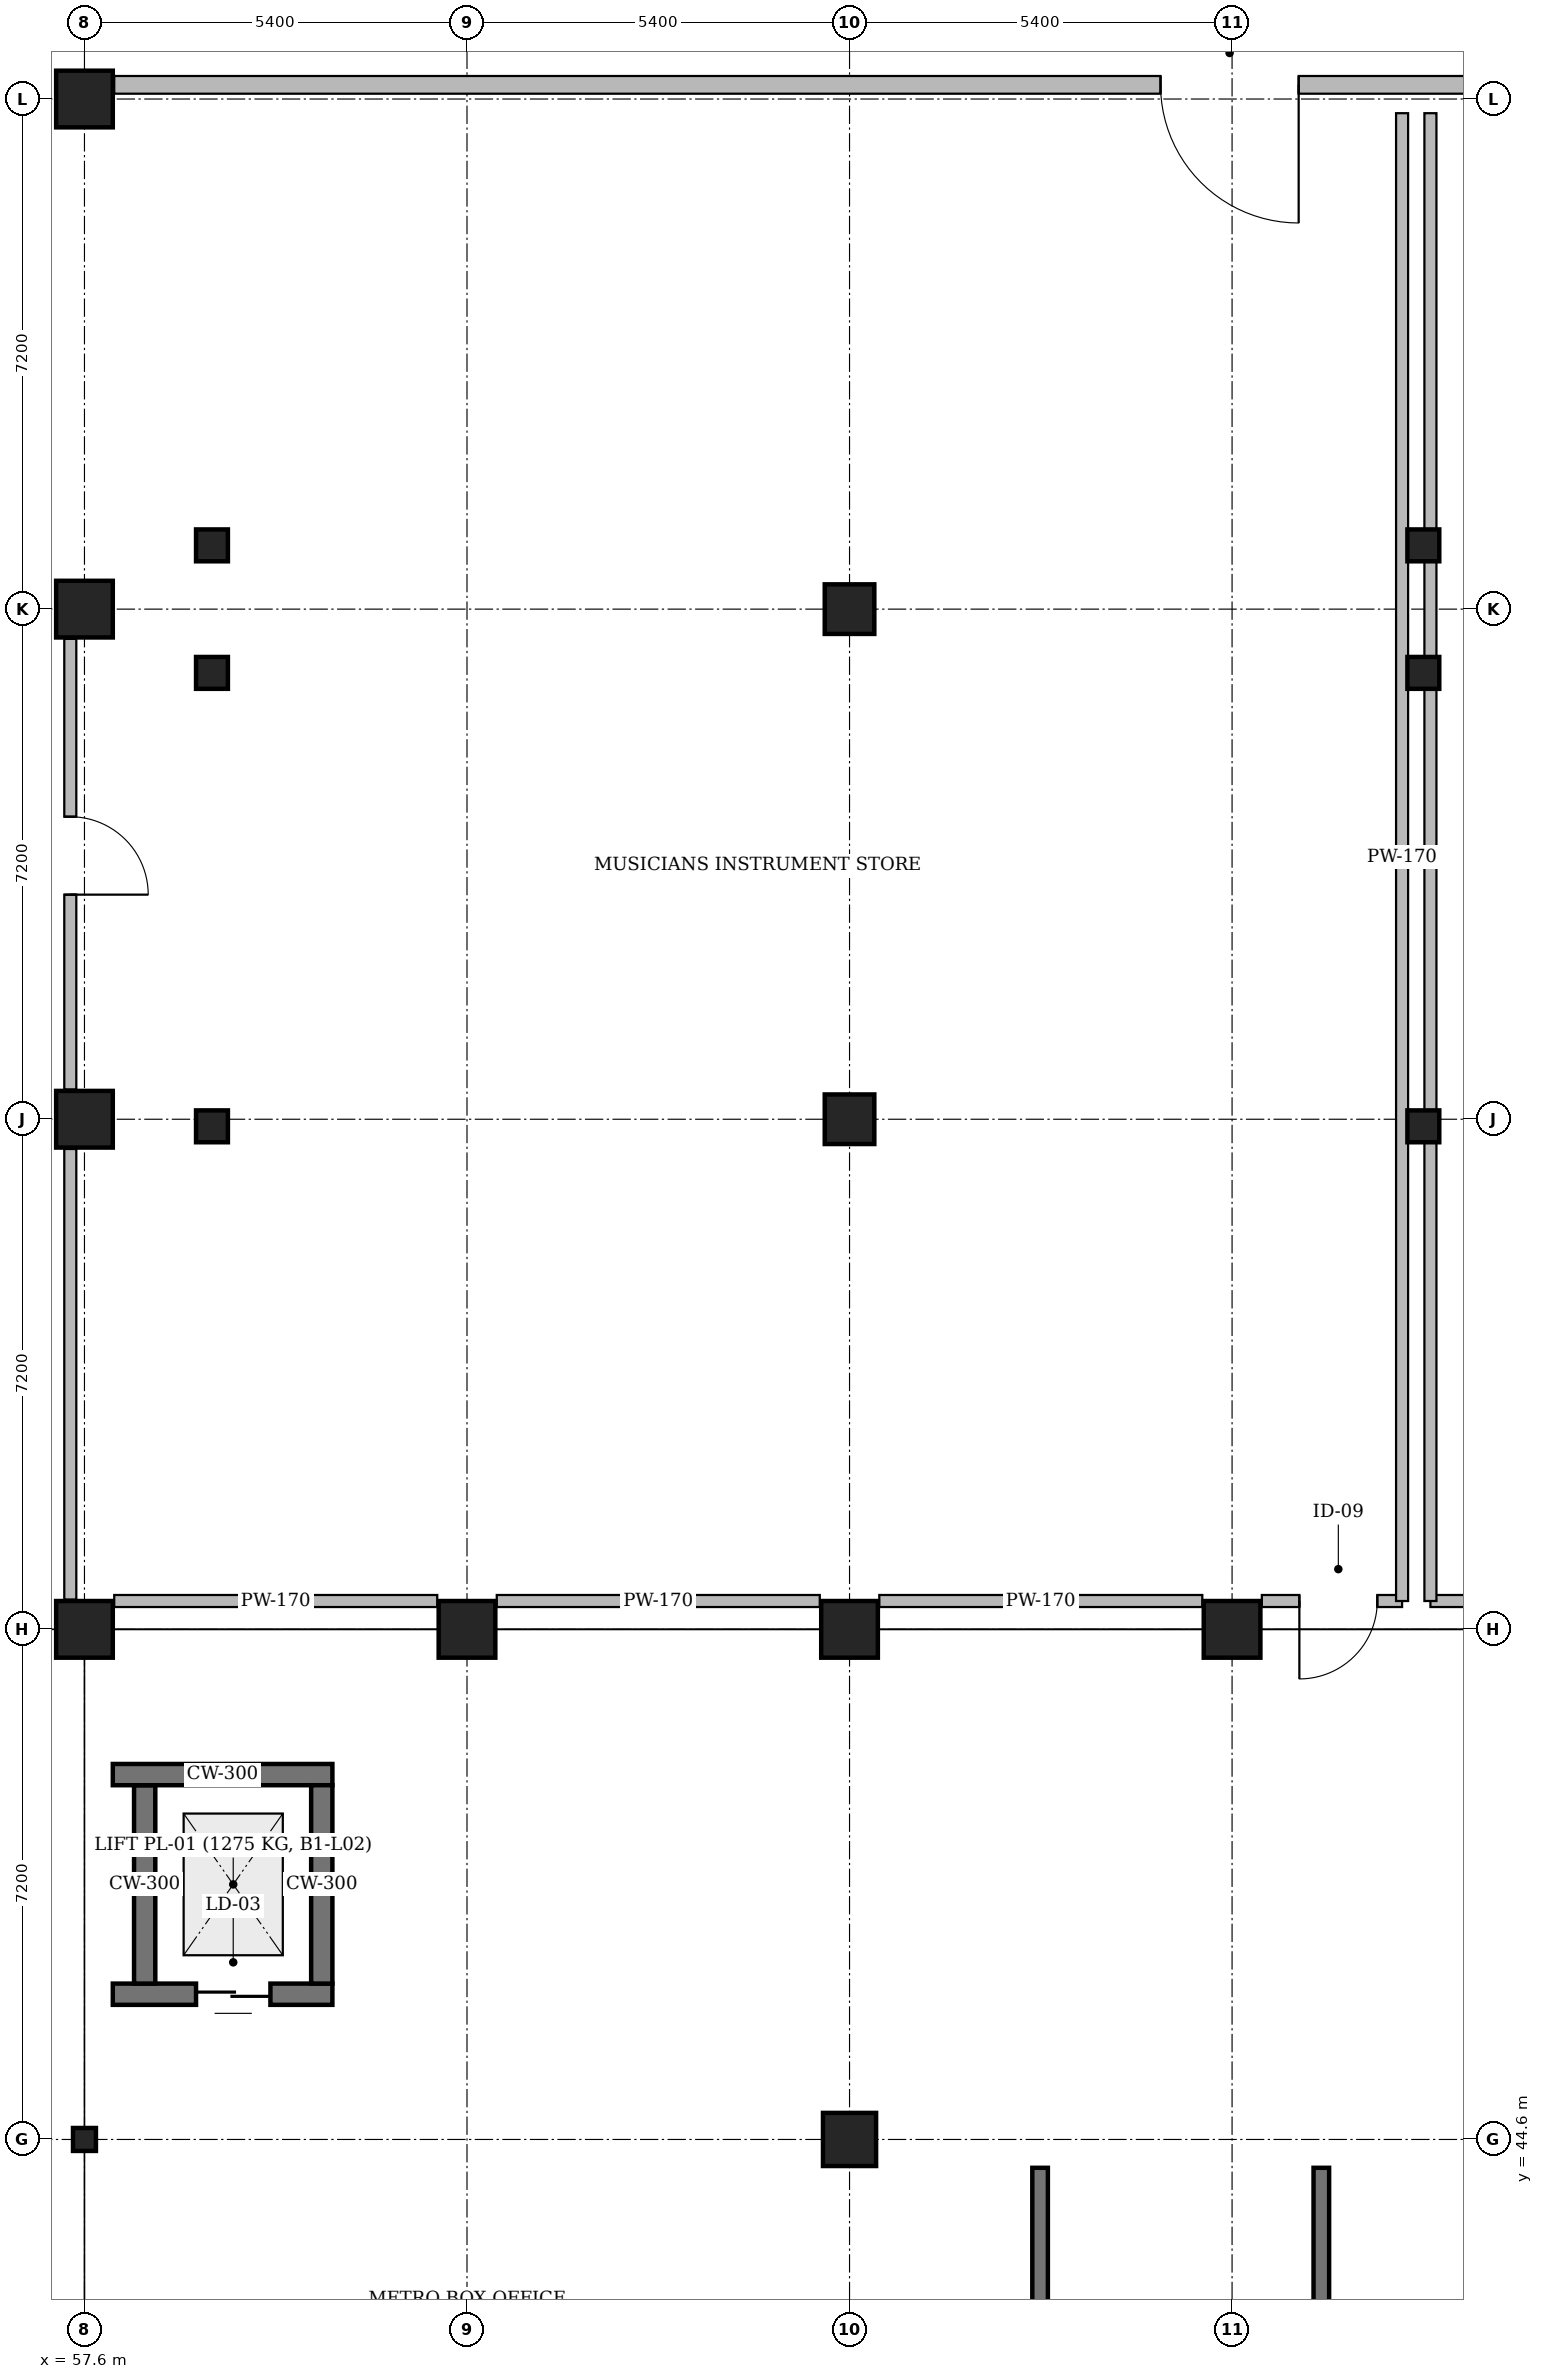
"""IFC4 building model, lengths in metres.
Left out: names, types, materials, properties, quantities, classifications, styles, units other than length and angle.
Written with IfcOpenShell. Run it as: python <this file> out.ifc"""

import sys

from ifc_helpers import new_model, si_unit, direction, frame, frame_2d, origin, origin_2d, place, context, subcontext, project, spatial, rectangle, circle, hollow_circle, extrude, element, fill, save


model = new_model("IFC4")
c1 = context("Model", 3, precision=1e-05, world=origin(), true_north=direction((0.0, 1.0)))
c2 = subcontext(c1, "Body", "Model", "MODEL_VIEW")
j1 = project(units=[si_unit("LENGTHUNIT", "METRE"), si_unit("PLANEANGLEUNIT", "RADIAN")], contexts=[c1])
p1 = place(None, origin())
s1 = spatial("IfcSite", under=j1, at=p1, CompositionType="ELEMENT")
p2 = place(p1, origin())
s2 = spatial("IfcBuilding", under=s1, at=p2, CompositionType="ELEMENT")
p3 = place(p2, frame((0.0, 0.0, -4.8)))
s3 = spatial("IfcBuildingStorey", under=s2, at=p3, CompositionType="ELEMENT", Elevation=-4.8)
p4 = place(p3, frame((68.4, 44.6, 0.0), z_axis=(0.0, 0.0, 1.0), x_axis=(1.0, 0.0, 0.0)))
e1 = element("IfcColumn", 1, at=p4, inside=s3, PredefinedType="COLUMN", context=c2, shape_type="SweptSolid", body=[
    extrude(circle(Radius=0.375, at=origin_2d()), origin(), (0.0, 0.0, 1.0), 4.8),
])
p5 = place(p3, frame((68.4, 51.8, 0.0), z_axis=(0.0, 0.0, 1.0), x_axis=(1.0, 0.0, 0.0)))
e2 = element("IfcColumn", 2, at=p5, inside=s3, PredefinedType="COLUMN", context=c2, shape_type="SweptSolid", body=[
    extrude(rectangle(XDim=0.8, YDim=0.8, at=origin_2d()), origin(), (0.0, 0.0, 1.0), 4.8),
])
for number, where, z_axis, x_axis in (
    (3, (68.4, 59.0, 0.0), (0.0, 0.0, 1.0), (1.0, 0.0, 0.0)),
    (4, (68.4, 66.2, 0.0), (0.0, 0.0, 1.0), (1.0, 0.0, 0.0)),
):
    element("IfcColumn", number, at=place(p3, frame(where, z_axis=z_axis, x_axis=x_axis)), inside=s3, PredefinedType="COLUMN", context=c2, shape_type="SweptSolid", body=[
        extrude(rectangle(XDim=0.7, YDim=0.7, at=origin_2d()), origin(), (0.0, 0.0, 1.0), 4.8),
    ])
p6 = place(p3, frame((73.8, 51.8, 0.0), z_axis=(0.0, 0.0, 1.0), x_axis=(1.0, 0.0, 0.0)))
e5 = element("IfcColumn", 5, at=p6, inside=s3, PredefinedType="COLUMN", context=c2, shape_type="SweptSolid", body=[
    extrude(rectangle(XDim=0.8, YDim=0.8, at=origin_2d()), origin(), (0.0, 0.0, 1.0), 4.8),
])
p7 = place(p3, frame((57.6, 44.6, 0.0), z_axis=(0.0, 0.0, 1.0), x_axis=(1.0, 0.0, 0.0)))
e6 = element("IfcColumn", 6, at=p7, inside=s3, PredefinedType="COLUMN", context=c2, shape_type="SweptSolid", body=[
    extrude(hollow_circle(Radius=0.162, WallThickness=0.012, at=origin_2d()), origin(), (0.0, 0.0, 1.0), 4.8),
])
for number, where, z_axis, x_axis in (
    (7, (57.6, 51.8, 0.0), (0.0, 0.0, 1.0), (1.0, 0.0, 0.0)),
    (8, (57.6, 59.0, 0.0), (0.0, 0.0, 1.0), (1.0, 0.0, 0.0)),
    (9, (57.6, 66.2, 0.0), (0.0, 0.0, 1.0), (1.0, 0.0, 0.0)),
    (10, (57.6, 73.4, 0.0), (0.0, 0.0, 1.0), (1.0, 0.0, 0.0)),
    (11, (63.0, 51.8, 0.0), (0.0, 0.0, 1.0), (1.0, 0.0, 0.0)),
):
    element("IfcColumn", number, at=place(p3, frame(where, z_axis=z_axis, x_axis=x_axis)), inside=s3, PredefinedType="COLUMN", context=c2, shape_type="SweptSolid", body=[
        extrude(rectangle(XDim=0.8, YDim=0.8, at=origin_2d()), origin(), (0.0, 0.0, 1.0), 4.8),
    ])
for number, where, z_axis, x_axis in (
    (12, (59.4, 67.1, 0.0), (0.0, 0.0, 1.0), (1.0, 0.0, 0.0)),
    (13, (76.5, 67.1, 0.0), (0.0, 0.0, 1.0), (1.0, 0.0, 0.0)),
    (14, (59.4, 65.3, 0.0), (0.0, 0.0, 1.0), (1.0, 0.0, 0.0)),
    (15, (76.5, 65.3, 0.0), (0.0, 0.0, 1.0), (1.0, 0.0, 0.0)),
    (16, (59.4, 58.9, 0.0), (0.0, 0.0, 1.0), (1.0, 0.0, 0.0)),
    (17, (76.5, 58.9, 0.0), (0.0, 0.0, 1.0), (1.0, 0.0, 0.0)),
):
    element("IfcColumn", number, at=place(p3, frame(where, z_axis=z_axis, x_axis=x_axis)), inside=s3, PredefinedType="COLUMN", context=c2, shape_type="SweptSolid", body=[
        extrude(rectangle(XDim=0.45, YDim=0.45, at=origin_2d()), origin(), (0.0, 0.0, 1.0), 4.8),
    ])
p8 = place(p3, frame((61.1, 46.65, 0.0), z_axis=(0.0, 0.0, 1.0), x_axis=(-1.0, 0.0, 0.0)))
e18 = element("IfcWall", 18, at=p8, inside=s3, PredefinedType="SOLIDWALL", context=c2, shape_type="SweptSolid", body=[
    extrude(rectangle(XDim=3.1, YDim=0.3, at=frame_2d((1.55, 0.0))), origin(), (0.0, 0.0, 1.0), 4.8),
])
p9 = place(p8, frame((0.875, 0.0, 0.0)))
e19 = element("IfcOpeningElement", 19, at=p9, cuts=e18, PredefinedType="OPENING", context=c2, shape_type="SweptSolid", body=[
    extrude(rectangle(XDim=1.05, YDim=2.1, at=frame_2d((0.525, 1.05))), frame((0.0, 0.17, 0.0), z_axis=(0.0, -1.0, 0.0), x_axis=(1.0, 0.0, 0.0)), (0.0, 0.0, 1.0), 0.34),
])
p10 = place(p3, frame((58.45, 46.8, 0.0), z_axis=(0.0, 0.0, 1.0), x_axis=(0.0, 1.0, 0.0)))
e20 = element("IfcWall", 20, at=p10, inside=s3, PredefinedType="SOLIDWALL", context=c2, shape_type="SweptSolid", body=[
    extrude(rectangle(XDim=2.8, YDim=0.3, at=frame_2d((1.4, 0.0))), origin(), (0.0, 0.0, 1.0), 4.8),
])
p11 = place(p3, frame((58.0, 49.75, 0.0), z_axis=(0.0, 0.0, 1.0), x_axis=(1.0, 0.0, 0.0)))
e21 = element("IfcWall", 21, at=p11, inside=s3, PredefinedType="SOLIDWALL", context=c2, shape_type="SweptSolid", body=[
    extrude(rectangle(XDim=3.1, YDim=0.3, at=frame_2d((1.55, 0.0))), origin(), (0.0, 0.0, 1.0), 4.8),
])
p12 = place(p3, frame((60.95, 49.6, 0.0), z_axis=(0.0, 0.0, 1.0), x_axis=(0.0, -1.0, 0.0)))
e22 = element("IfcWall", 22, at=p12, inside=s3, PredefinedType="SOLIDWALL", context=c2, shape_type="SweptSolid", body=[
    extrude(rectangle(XDim=2.8, YDim=0.3, at=frame_2d((1.4, 0.0))), origin(), (0.0, 0.0, 1.0), 4.8),
])
for number, where, z_axis, x_axis in (
    (23, (71.09, 36.6, 0.0), (0.0, 0.0, 1.0), (0.0, 1.0, 0.0)),
    (24, (75.06, 36.6, 0.0), (0.0, 0.0, 1.0), (0.0, 1.0, 0.0)),
):
    element("IfcWall", number, at=place(p3, frame(where, z_axis=z_axis, x_axis=x_axis)), inside=s3, PredefinedType="SOLIDWALL", context=c2, shape_type="SweptSolid", body=[
        extrude(rectangle(XDim=7.6, YDim=0.22, at=frame_2d((3.8, 0.0))), origin(), (0.0, 0.0, 1.0), 4.52),
    ])
p13 = place(p3, frame((94.98, 73.6, 0.0), z_axis=(0.0, 0.0, 1.0), x_axis=(-1.0, 0.0, 0.0)))
e25 = element("IfcWall", 25, at=p13, inside=s3, PredefinedType="PARTITIONING", context=c2, shape_type="SweptSolid", body=[
    extrude(rectangle(XDim=36.96, YDim=0.25, at=frame_2d((18.48, 0.0))), origin(), (0.0, 0.0, 1.0), 4.52),
])
p14 = place(p13, frame((20.24, 0.0, 0.0)))
e26 = element("IfcOpeningElement", 26, at=p14, cuts=e25, PredefinedType="OPENING", context=c2, shape_type="SweptSolid", body=[
    extrude(rectangle(XDim=1.95, YDim=2.4, at=frame_2d((0.975, 1.2))), frame((0.0, 0.145, 0.0), z_axis=(0.0, -1.0, 0.0), x_axis=(1.0, 0.0, 0.0)), (0.0, 0.0, 1.0), 0.29),
])
p15 = place(p3, frame((76.2, 52.2, 0.0), z_axis=(0.0, 0.0, 1.0), x_axis=(-1.0, 0.0, 0.0)))
e27 = element("IfcWall", 27, at=p15, inside=s3, PredefinedType="PARTITIONING", context=c2, shape_type="SweptSolid", body=[
    extrude(rectangle(XDim=1.98, YDim=0.17, at=frame_2d((0.99, 0.0))), origin(), (0.0, 0.0, 1.0), 3.84),
])
p16 = place(p15, frame((0.35, 0.0, 0.0)))
e28 = element("IfcOpeningElement", 28, at=p16, cuts=e27, PredefinedType="OPENING", context=c2, shape_type="SweptSolid", body=[
    extrude(rectangle(XDim=1.1, YDim=2.1, at=frame_2d((0.55, 1.05))), frame((0.0, 0.105, 0.0), z_axis=(0.0, -1.0, 0.0), x_axis=(1.0, 0.0, 0.0)), (0.0, 0.0, 1.0), 0.21),
])
p17 = place(p3, frame((73.38, 52.2, 0.0), z_axis=(0.0, 0.0, 1.0), x_axis=(-1.0, 0.0, 0.0)))
e29 = element("IfcWall", 29, at=p17, inside=s3, PredefinedType="PARTITIONING", context=c2, shape_type="SweptSolid", body=[
    extrude(rectangle(XDim=4.56, YDim=0.17, at=frame_2d((2.28, 0.0))), origin(), (0.0, 0.0, 1.0), 3.84),
])
for number, where, z_axis, x_axis in (
    (30, (67.98, 52.2, 0.0), (0.0, 0.0, 1.0), (-1.0, 0.0, 0.0)),
    (31, (62.58, 52.2, 0.0), (0.0, 0.0, 1.0), (-1.0, 0.0, 0.0)),
):
    element("IfcWall", number, at=place(p3, frame(where, z_axis=z_axis, x_axis=x_axis)), inside=s3, PredefinedType="PARTITIONING", context=c2, shape_type="SweptSolid", body=[
        extrude(rectangle(XDim=4.56, YDim=0.17, at=frame_2d((2.28, 0.0))), origin(), (0.0, 0.0, 1.0), 3.84),
    ])
p18 = place(p3, frame((76.2, 73.2, 0.0), z_axis=(0.0, 0.0, 1.0), x_axis=(0.0, -1.0, 0.0)))
e32 = element("IfcWall", 32, at=p18, inside=s3, PredefinedType="PARTITIONING", context=c2, shape_type="SweptSolid", body=[
    extrude(rectangle(XDim=21.0, YDim=0.17, at=frame_2d((10.5, 0.0))), origin(), (0.0, 0.0, 1.0), 4.04),
])
p19 = place(p3, frame((78.78, 52.2, 0.0), z_axis=(0.0, 0.0, 1.0), x_axis=(-1.0, 0.0, 0.0)))
e33 = element("IfcWall", 33, at=p19, inside=s3, PredefinedType="PARTITIONING", context=c2, shape_type="SweptSolid", body=[
    extrude(rectangle(XDim=2.18, YDim=0.17, at=frame_2d((1.09, 0.0))), origin(), (0.0, 0.0, 1.0), 3.84),
])
p20 = place(p3, frame((76.6, 52.2, 0.0), z_axis=(0.0, 0.0, 1.0), x_axis=(0.0, 1.0, 0.0)))
e34 = element("IfcWall", 34, at=p20, inside=s3, PredefinedType="PARTITIONING", context=c2, shape_type="SweptSolid", body=[
    extrude(rectangle(XDim=21.0, YDim=0.17, at=frame_2d((10.5, 0.0))), origin(), (0.0, 0.0, 1.0), 4.04),
])
p21 = place(p3, frame((57.4, 65.78, 0.0), z_axis=(0.0, 0.0, 1.0), x_axis=(0.0, -1.0, 0.0)))
e35 = element("IfcWall", 35, at=p21, inside=s3, PredefinedType="PARTITIONING", context=c2, shape_type="SweptSolid", body=[
    extrude(rectangle(XDim=6.36, YDim=0.17, at=frame_2d((3.18, 0.0))), origin(), (0.0, 0.0, 1.0), 3.84),
])
p22 = place(p21, frame((2.51, 0.0, 0.0)))
e36 = element("IfcOpeningElement", 36, at=p22, cuts=e35, PredefinedType="OPENING", context=c2, shape_type="SweptSolid", body=[
    extrude(rectangle(XDim=1.1, YDim=2.1, at=frame_2d((0.55, 1.05))), frame((0.0, 0.105, 0.0), z_axis=(0.0, -1.0, 0.0), x_axis=(1.0, 0.0, 0.0)), (0.0, 0.0, 1.0), 0.21),
])
p23 = place(p3, frame((57.4, 58.58, 0.0), z_axis=(0.0, 0.0, 1.0), x_axis=(0.0, -1.0, 0.0)))
e37 = element("IfcWall", 37, at=p23, inside=s3, PredefinedType="PARTITIONING", context=c2, shape_type="SweptSolid", body=[
    extrude(rectangle(XDim=6.36, YDim=0.17, at=frame_2d((3.18, 0.0))), origin(), (0.0, 0.0, 1.0), 3.84),
])
p24 = place(p9, origin())
e38 = element("IfcDoor", 38, at=p24, inside=s3, OperationType="DOUBLE_DOOR_SLIDING", PredefinedType="DOOR", context=c2, shape_type="SweptSolid", body=[
    extrude(rectangle(XDim=1.05, YDim=2.1, at=frame_2d((0.525, 1.05))), frame((0.0, 0.025, 0.0), z_axis=(0.0, -1.0, 0.0), x_axis=(1.0, 0.0, 0.0)), (0.0, 0.0, 1.0), 0.05),
])
fill(e19, e38)
p25 = place(p14, origin())
e39 = element("IfcDoor", 39, at=p25, inside=s3, OperationType="DOUBLE_DOOR_SINGLE_SWING", PredefinedType="DOOR", context=c2, shape_type="SweptSolid", body=[
    extrude(rectangle(XDim=1.95, YDim=2.4, at=frame_2d((0.975, 1.2))), frame((0.0, 0.025, 0.0), z_axis=(0.0, -1.0, 0.0), x_axis=(1.0, 0.0, 0.0)), (0.0, 0.0, 1.0), 0.05),
])
fill(e26, e39)
p26 = place(p16, origin())
e40 = element("IfcDoor", 40, at=p26, inside=s3, OperationType="SINGLE_SWING_RIGHT", PredefinedType="DOOR", context=c2, shape_type="SweptSolid", body=[
    extrude(rectangle(XDim=1.1, YDim=2.1, at=frame_2d((0.55, 1.05))), frame((0.0, 0.025, 0.0), z_axis=(0.0, -1.0, 0.0), x_axis=(1.0, 0.0, 0.0)), (0.0, 0.0, 1.0), 0.05),
])
fill(e28, e40)
p27 = place(p22, origin())
e41 = element("IfcDoor", 41, at=p27, inside=s3, OperationType="SINGLE_SWING_RIGHT", PredefinedType="DOOR", context=c2, shape_type="SweptSolid", body=[
    extrude(rectangle(XDim=1.1, YDim=2.1, at=frame_2d((0.55, 1.05))), frame((0.0, 0.025, 0.0), z_axis=(0.0, -1.0, 0.0), x_axis=(1.0, 0.0, 0.0)), (0.0, 0.0, 1.0), 0.05),
])
fill(e36, e41)
save(model, sys.argv[1])
